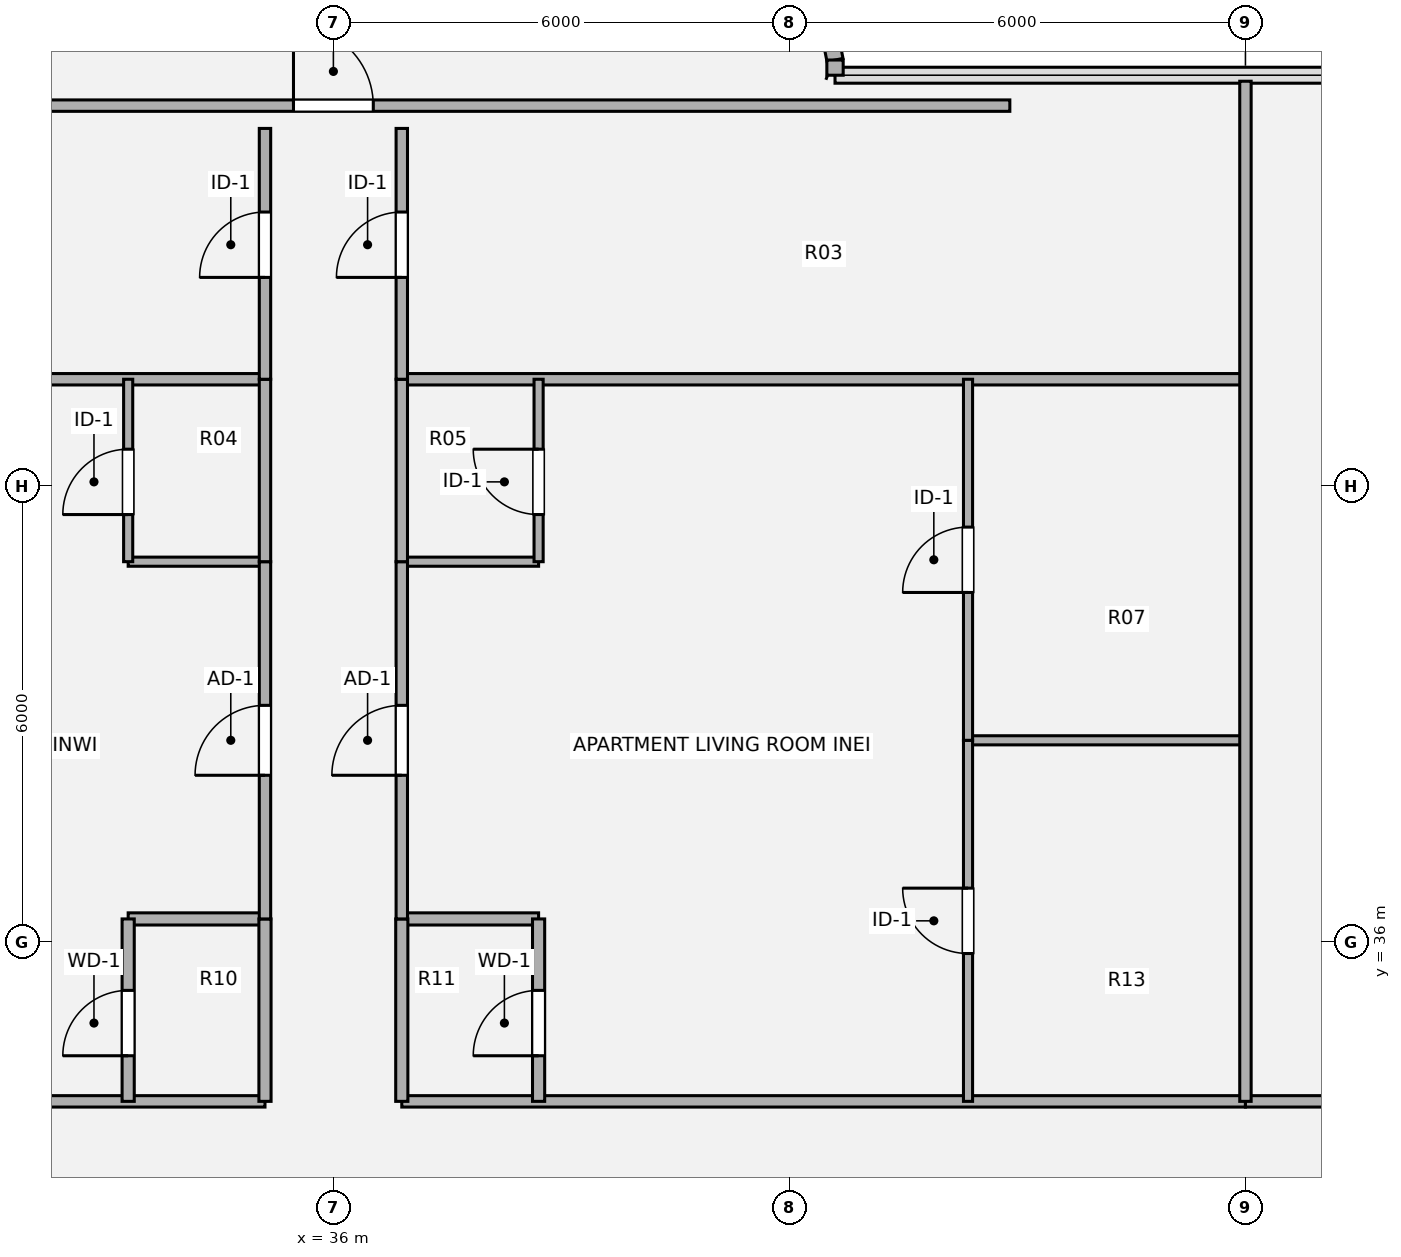
"""IFC4 building model, lengths in metres.
Left out: names, types, materials, properties, quantities, classifications, styles, units other than length and angle.
Written with IfcOpenShell. Run it as: python <this file> out.ifc"""

import sys

from ifc_helpers import new_model, si_unit, direction, frame, frame_2d, origin, origin_2d, place, context, subcontext, project, spatial, rectangle, extrude, source, transform, mapped, element, fill, save


model = new_model("IFC4")
c1 = context("Model", 3, precision=1e-05, world=origin(), true_north=direction((0.0, 1.0)))
c2 = subcontext(c1, "Body", "Model", "MODEL_VIEW")
j1 = project(units=[si_unit("LENGTHUNIT", "METRE"), si_unit("PLANEANGLEUNIT", "RADIAN")], contexts=[c1])
p1 = place(None, origin())
s1 = spatial("IfcSite", under=j1, at=p1, CompositionType="ELEMENT")
p2 = place(p1, origin())
s2 = spatial("IfcBuilding", under=s1, at=p2, CompositionType="ELEMENT")
p3 = place(p2, frame((0.0, 0.0, 93.6)))
s3 = spatial("IfcBuildingStorey", under=s2, at=p3, CompositionType="ELEMENT", Elevation=93.6)
p4 = place(p3, frame((42.387, 48.671, 0.0), z_axis=(0.0, 0.0, 1.0), x_axis=(0.195127417394, -0.980777900945, 0.0)))
e1 = element("IfcWall", 1, at=p4, inside=s3, PredefinedType="SOLIDWALL", context=c2, shape_type="SweptSolid", body=[
    extrude(rectangle(XDim=1.092, YDim=0.215, at=frame_2d((0.546, 0.0))), origin(), (0.0, 0.0, 1.0), 3.53),
])
p5 = place(p3, frame((42.6, 47.6, 0.0), z_axis=(0.0, 0.0, 1.0), x_axis=(0.0, -1.0, 0.0)))
e2 = element("IfcWall", 2, at=p5, inside=s3, PredefinedType="SOLIDWALL", context=c2, shape_type="SweptSolid", body=[
    extrude(rectangle(XDim=0.2, YDim=0.215, at=frame_2d((0.1, 0.0))), origin(), (0.0, 0.0, 1.0), 3.53),
])
for number, where, z_axis, x_axis in (
    (3, (24.0, 33.9, 0.0), (0.0, 0.0, 1.0), (1.0, 0.0, 0.0)),
    (4, (36.9, 33.9, 0.0), (0.0, 0.0, 1.0), (1.0, 0.0, 0.0)),
):
    element("IfcWall", number, at=place(p3, frame(where, z_axis=z_axis, x_axis=x_axis)), inside=s3, PredefinedType="PARTITIONING", context=c2, shape_type="SweptSolid", body=[
        extrude(rectangle(XDim=11.1, YDim=0.15, at=frame_2d((5.55, 0.0))), origin(), (0.0, 0.0, 1.0), 2.982),
    ])
p6 = place(p3, frame((48.0, 33.9, 0.0), z_axis=(0.0, 0.0, 1.0), x_axis=(1.0, 0.0, 0.0)))
e5 = element("IfcWall", 5, at=p6, inside=s3, PredefinedType="PARTITIONING", context=c2, shape_type="SweptSolid", body=[
    extrude(rectangle(XDim=10.02, YDim=0.15, at=frame_2d((5.01, 0.0))), origin(), (0.0, 0.0, 1.0), 2.982),
])
p7 = place(p6, frame((2.275, 0.0, 0.0)))
e6 = element("IfcOpeningElement", 6, at=p7, cuts=e5, PredefinedType="OPENING", context=c2, shape_type="SweptSolid", body=[
    extrude(rectangle(XDim=1.05, YDim=2.1, at=origin_2d()), frame((0.525, 0.085, 1.05), z_axis=(0.0, -1.0, 0.0), x_axis=(1.0, 0.0, 0.0)), (0.0, 0.0, 1.0), 0.17),
])
for number, where, z_axis, x_axis in (
    (7, (33.3, 36.3, 0.0), (0.0, 0.0, 1.0), (1.0, 0.0, 0.0)),
    (8, (36.9, 36.3, 0.0), (0.0, 0.0, 1.0), (1.0, 0.0, 0.0)),
):
    element("IfcWall", number, at=place(p3, frame(where, z_axis=z_axis, x_axis=x_axis)), inside=s3, PredefinedType="PLUMBINGWALL", context=c2, shape_type="SweptSolid", body=[
        extrude(rectangle(XDim=1.8, YDim=0.16, at=frame_2d((0.9, 0.0))), origin(), (0.0, 0.0, 1.0), 3.259),
    ])
p8 = place(p3, frame((44.35, 38.65, 0.0), z_axis=(0.0, 0.0, 1.0), x_axis=(1.0, 0.0, 0.0)))
e9 = element("IfcWall", 9, at=p8, inside=s3, PredefinedType="PARTITIONING", context=c2, shape_type="SweptSolid", body=[
    extrude(rectangle(XDim=3.65, YDim=0.12, at=frame_2d((1.825, 0.0))), origin(), (0.0, 0.0, 1.0), 2.903),
])
for number, where, z_axis, x_axis in (
    (10, (33.3, 41.0, 0.0), (0.0, 0.0, 1.0), (1.0, 0.0, 0.0)),
    (11, (36.9, 41.0, 0.0), (0.0, 0.0, 1.0), (1.0, 0.0, 0.0)),
):
    element("IfcWall", number, at=place(p3, frame(where, z_axis=z_axis, x_axis=x_axis)), inside=s3, PredefinedType="PARTITIONING", context=c2, shape_type="SweptSolid", body=[
        extrude(rectangle(XDim=1.8, YDim=0.12, at=frame_2d((0.9, 0.0))), origin(), (0.0, 0.0, 1.0), 3.259),
    ])
for number, where, z_axis, x_axis in (
    (12, (24.0, 43.4, 0.0), (0.0, 0.0, 1.0), (1.0, 0.0, 0.0)),
    (13, (36.9, 43.4, 0.0), (0.0, 0.0, 1.0), (1.0, 0.0, 0.0)),
):
    element("IfcWall", number, at=place(p3, frame(where, z_axis=z_axis, x_axis=x_axis)), inside=s3, PredefinedType="PARTITIONING", context=c2, shape_type="SweptSolid", body=[
        extrude(rectangle(XDim=11.1, YDim=0.15, at=frame_2d((5.55, 0.0))), origin(), (0.0, 0.0, 1.0), 3.308),
    ])
p9 = place(p3, frame((27.1, 47.0, 0.0), z_axis=(0.0, 0.0, 1.0), x_axis=(1.0, 0.0, 0.0)))
e14 = element("IfcWall", 14, at=p9, inside=s3, PredefinedType="PARTITIONING", context=c2, shape_type="SweptSolid", body=[
    extrude(rectangle(XDim=17.8, YDim=0.15, at=frame_2d((8.9, 0.0))), origin(), (0.0, 0.0, 1.0), 3.308),
])
p10 = place(p9, frame((8.375, 0.0, 0.0)))
e15 = element("IfcOpeningElement", 15, at=p10, cuts=e14, PredefinedType="OPENING", context=c2, shape_type="SweptSolid", body=[
    extrude(rectangle(XDim=1.05, YDim=2.1, at=origin_2d()), frame((0.525, 0.085, 1.05), z_axis=(0.0, -1.0, 0.0), x_axis=(1.0, 0.0, 0.0)), (0.0, 0.0, 1.0), 0.17),
])
p11 = place(p3, frame((33.3, 33.9, 0.0), z_axis=(0.0, 0.0, 1.0), x_axis=(0.0, 1.0, 0.0)))
e16 = element("IfcWall", 16, at=p11, inside=s3, PredefinedType="PLUMBINGWALL", context=c2, shape_type="SweptSolid", body=[
    extrude(rectangle(XDim=2.4, YDim=0.16, at=frame_2d((1.2, 0.0))), origin(), (0.0, 0.0, 1.0), 3.5),
])
p12 = place(p11, frame((0.6, 0.0, 0.0)))
e17 = element("IfcOpeningElement", 17, at=p12, cuts=e16, PredefinedType="OPENING", context=c2, shape_type="SweptSolid", body=[
    extrude(rectangle(XDim=0.86, YDim=2.1, at=origin_2d()), frame((0.43, 0.09, 1.05), z_axis=(0.0, -1.0, 0.0), x_axis=(1.0, 0.0, 0.0)), (0.0, 0.0, 1.0), 0.18),
])
p13 = place(p3, frame((33.3, 41.0, 0.0), z_axis=(0.0, 0.0, 1.0), x_axis=(0.0, 1.0, 0.0)))
e18 = element("IfcWall", 18, at=p13, inside=s3, PredefinedType="PARTITIONING", context=c2, shape_type="SweptSolid", body=[
    extrude(rectangle(XDim=2.4, YDim=0.12, at=frame_2d((1.2, 0.0))), origin(), (0.0, 0.0, 1.0), 3.5),
])
p14 = place(p13, frame((0.62, 0.0, 0.0)))
e19 = element("IfcOpeningElement", 19, at=p14, cuts=e18, PredefinedType="OPENING", context=c2, shape_type="SweptSolid", body=[
    extrude(rectangle(XDim=0.86, YDim=2.1, at=origin_2d()), frame((0.43, 0.07, 1.05), z_axis=(0.0, -1.0, 0.0), x_axis=(1.0, 0.0, 0.0)), (0.0, 0.0, 1.0), 0.14),
])
p15 = place(p3, frame((35.1, 33.9, 0.0), z_axis=(0.0, 0.0, 1.0), x_axis=(0.0, 1.0, 0.0)))
e20 = element("IfcWall", 20, at=p15, inside=s3, PredefinedType="PLUMBINGWALL", context=c2, shape_type="SweptSolid", body=[
    extrude(rectangle(XDim=2.4, YDim=0.16, at=frame_2d((1.2, 0.0))), origin(), (0.0, 0.0, 1.0), 3.5),
])
p16 = place(p3, frame((35.1, 36.3, 0.0), z_axis=(0.0, 0.0, 1.0), x_axis=(0.0, 1.0, 0.0)))
e21 = element("IfcWall", 21, at=p16, inside=s3, PredefinedType="PARTITIONING", context=c2, shape_type="SweptSolid", body=[
    extrude(rectangle(XDim=4.7, YDim=0.15, at=frame_2d((2.35, 0.0))), origin(), (0.0, 0.0, 1.0), 3.5),
])
p17 = place(p16, frame((1.89, 0.0, 0.0)))
e22 = element("IfcOpeningElement", 22, at=p17, cuts=e21, PredefinedType="OPENING", context=c2, shape_type="SweptSolid", body=[
    extrude(rectangle(XDim=0.92, YDim=2.1, at=origin_2d()), frame((0.46, 0.085, 1.05), z_axis=(0.0, -1.0, 0.0), x_axis=(1.0, 0.0, 0.0)), (0.0, 0.0, 1.0), 0.17),
])
p18 = place(p3, frame((35.1, 41.0, 0.0), z_axis=(0.0, 0.0, 1.0), x_axis=(0.0, 1.0, 0.0)))
e23 = element("IfcWall", 23, at=p18, inside=s3, PredefinedType="PARTITIONING", context=c2, shape_type="SweptSolid", body=[
    extrude(rectangle(XDim=2.4, YDim=0.15, at=frame_2d((1.2, 0.0))), origin(), (0.0, 0.0, 1.0), 3.5),
])
p19 = place(p3, frame((35.1, 43.4, 0.0), z_axis=(0.0, 0.0, 1.0), x_axis=(0.0, 1.0, 0.0)))
e24 = element("IfcWall", 24, at=p19, inside=s3, PredefinedType="PARTITIONING", context=c2, shape_type="SweptSolid", body=[
    extrude(rectangle(XDim=3.3, YDim=0.15, at=frame_2d((1.65, 0.0))), origin(), (0.0, 0.0, 1.0), 3.5),
])
p20 = place(p19, frame((1.34, 0.0, 0.0)))
e25 = element("IfcOpeningElement", 25, at=p20, cuts=e24, PredefinedType="OPENING", context=c2, shape_type="SweptSolid", body=[
    extrude(rectangle(XDim=0.86, YDim=2.1, at=origin_2d()), frame((0.43, 0.085, 1.05), z_axis=(0.0, -1.0, 0.0), x_axis=(1.0, 0.0, 0.0)), (0.0, 0.0, 1.0), 0.17),
])
p21 = place(p3, frame((36.9, 33.9, 0.0), z_axis=(0.0, 0.0, 1.0), x_axis=(0.0, 1.0, 0.0)))
e26 = element("IfcWall", 26, at=p21, inside=s3, PredefinedType="PLUMBINGWALL", context=c2, shape_type="SweptSolid", body=[
    extrude(rectangle(XDim=2.4, YDim=0.16, at=frame_2d((1.2, 0.0))), origin(), (0.0, 0.0, 1.0), 3.5),
])
p22 = place(p3, frame((36.9, 36.3, 0.0), z_axis=(0.0, 0.0, 1.0), x_axis=(0.0, 1.0, 0.0)))
e27 = element("IfcWall", 27, at=p22, inside=s3, PredefinedType="PARTITIONING", context=c2, shape_type="SweptSolid", body=[
    extrude(rectangle(XDim=4.7, YDim=0.15, at=frame_2d((2.35, 0.0))), origin(), (0.0, 0.0, 1.0), 3.5),
])
p23 = place(p22, frame((1.89, 0.0, 0.0)))
e28 = element("IfcOpeningElement", 28, at=p23, cuts=e27, PredefinedType="OPENING", context=c2, shape_type="SweptSolid", body=[
    extrude(rectangle(XDim=0.92, YDim=2.1, at=origin_2d()), frame((0.46, 0.085, 1.05), z_axis=(0.0, -1.0, 0.0), x_axis=(1.0, 0.0, 0.0)), (0.0, 0.0, 1.0), 0.17),
])
p24 = place(p3, frame((36.9, 41.0, 0.0), z_axis=(0.0, 0.0, 1.0), x_axis=(0.0, 1.0, 0.0)))
e29 = element("IfcWall", 29, at=p24, inside=s3, PredefinedType="PARTITIONING", context=c2, shape_type="SweptSolid", body=[
    extrude(rectangle(XDim=2.4, YDim=0.15, at=frame_2d((1.2, 0.0))), origin(), (0.0, 0.0, 1.0), 3.5),
])
p25 = place(p3, frame((36.9, 43.4, 0.0), z_axis=(0.0, 0.0, 1.0), x_axis=(0.0, 1.0, 0.0)))
e30 = element("IfcWall", 30, at=p25, inside=s3, PredefinedType="PARTITIONING", context=c2, shape_type="SweptSolid", body=[
    extrude(rectangle(XDim=3.3, YDim=0.15, at=frame_2d((1.65, 0.0))), origin(), (0.0, 0.0, 1.0), 3.5),
])
p26 = place(p25, frame((1.34, 0.0, 0.0)))
e31 = element("IfcOpeningElement", 31, at=p26, cuts=e30, PredefinedType="OPENING", context=c2, shape_type="SweptSolid", body=[
    extrude(rectangle(XDim=0.86, YDim=2.1, at=origin_2d()), frame((0.43, 0.085, 1.05), z_axis=(0.0, -1.0, 0.0), x_axis=(1.0, 0.0, 0.0)), (0.0, 0.0, 1.0), 0.17),
])
p27 = place(p3, frame((38.7, 33.9, 0.0), z_axis=(0.0, 0.0, 1.0), x_axis=(0.0, 1.0, 0.0)))
e32 = element("IfcWall", 32, at=p27, inside=s3, PredefinedType="PLUMBINGWALL", context=c2, shape_type="SweptSolid", body=[
    extrude(rectangle(XDim=2.4, YDim=0.16, at=frame_2d((1.2, 0.0))), origin(), (0.0, 0.0, 1.0), 3.5),
])
p28 = place(p27, frame((0.6, 0.0, 0.0)))
e33 = element("IfcOpeningElement", 33, at=p28, cuts=e32, PredefinedType="OPENING", context=c2, shape_type="SweptSolid", body=[
    extrude(rectangle(XDim=0.86, YDim=2.1, at=origin_2d()), frame((0.43, 0.09, 1.05), z_axis=(0.0, -1.0, 0.0), x_axis=(1.0, 0.0, 0.0)), (0.0, 0.0, 1.0), 0.18),
])
p29 = place(p3, frame((38.7, 41.0, 0.0), z_axis=(0.0, 0.0, 1.0), x_axis=(0.0, 1.0, 0.0)))
e34 = element("IfcWall", 34, at=p29, inside=s3, PredefinedType="PARTITIONING", context=c2, shape_type="SweptSolid", body=[
    extrude(rectangle(XDim=2.4, YDim=0.12, at=frame_2d((1.2, 0.0))), origin(), (0.0, 0.0, 1.0), 3.5),
])
p30 = place(p29, frame((0.62, 0.0, 0.0)))
e35 = element("IfcOpeningElement", 35, at=p30, cuts=e34, PredefinedType="OPENING", context=c2, shape_type="SweptSolid", body=[
    extrude(rectangle(XDim=0.86, YDim=2.1, at=origin_2d()), frame((0.43, 0.07, 1.05), z_axis=(0.0, -1.0, 0.0), x_axis=(1.0, 0.0, 0.0)), (0.0, 0.0, 1.0), 0.14),
])
p31 = place(p3, frame((44.35, 33.9, 0.0), z_axis=(0.0, 0.0, 1.0), x_axis=(0.0, 1.0, 0.0)))
e36 = element("IfcWall", 36, at=p31, inside=s3, PredefinedType="PARTITIONING", context=c2, shape_type="SweptSolid", body=[
    extrude(rectangle(XDim=4.75, YDim=0.12, at=frame_2d((2.375, 0.0))), origin(), (0.0, 0.0, 1.0), 3.5),
])
p32 = place(p31, frame((1.945, 0.0, 0.0)))
e37 = element("IfcOpeningElement", 37, at=p32, cuts=e36, PredefinedType="OPENING", context=c2, shape_type="SweptSolid", body=[
    extrude(rectangle(XDim=0.86, YDim=2.1, at=origin_2d()), frame((0.43, 0.07, 1.05), z_axis=(0.0, -1.0, 0.0), x_axis=(1.0, 0.0, 0.0)), (0.0, 0.0, 1.0), 0.14),
])
p33 = place(p3, frame((44.35, 38.65, 0.0), z_axis=(0.0, 0.0, 1.0), x_axis=(0.0, 1.0, 0.0)))
e38 = element("IfcWall", 38, at=p33, inside=s3, PredefinedType="PARTITIONING", context=c2, shape_type="SweptSolid", body=[
    extrude(rectangle(XDim=4.75, YDim=0.12, at=frame_2d((2.375, 0.0))), origin(), (0.0, 0.0, 1.0), 3.5),
])
p34 = place(p33, frame((1.945, 0.0, 0.0)))
e39 = element("IfcOpeningElement", 39, at=p34, cuts=e38, PredefinedType="OPENING", context=c2, shape_type="SweptSolid", body=[
    extrude(rectangle(XDim=0.86, YDim=2.1, at=origin_2d()), frame((0.43, 0.07, 1.05), z_axis=(0.0, -1.0, 0.0), x_axis=(1.0, 0.0, 0.0)), (0.0, 0.0, 1.0), 0.14),
])
p35 = place(p3, frame((48.0, 33.9, 0.0), z_axis=(0.0, 0.0, 1.0), x_axis=(0.0, 1.0, 0.0)))
e40 = element("IfcWall", 40, at=p35, inside=s3, PredefinedType="PARTITIONING", context=c2, shape_type="SweptSolid", body=[
    extrude(rectangle(XDim=13.421, YDim=0.15, at=frame_2d((6.71, 0.0))), origin(), (0.0, 0.0, 1.0), 3.5),
])
m1 = source(origin(), c2, "Body", "SweptSolid", [
    extrude(rectangle(XDim=1.05, YDim=2.1, at=origin_2d()), frame((0.525, 0.025, 1.05), z_axis=(0.0, -1.0, 0.0), x_axis=(1.0, 0.0, 0.0)), (0.0, 0.0, 1.0), 0.05),
])
p36 = place(p10, origin())
e41 = element("IfcDoor", 41, at=p36, inside=s3, OperationType="SINGLE_SWING_LEFT", PredefinedType="DOOR", context=c2, shape_type="MappedRepresentation", body=[
    mapped(m1, transform((0.0, 0.0, 0.0), x_axis=(1.0, 0.0, 0.0), y_axis=(0.0, 1.0, 0.0), z_axis=(0.0, 0.0, 1.0), scale=1.0)),
])
fill(e15, e41)
m2 = source(origin(), c2, "Body", "SweptSolid", [
    extrude(rectangle(XDim=0.86, YDim=2.1, at=origin_2d()), frame((0.43, 0.025, 1.05), z_axis=(0.0, -1.0, 0.0), x_axis=(1.0, 0.0, 0.0)), (0.0, 0.0, 1.0), 0.05),
])
p37 = place(p12, origin())
e42 = element("IfcDoor", 42, at=p37, inside=s3, OperationType="SINGLE_SWING_LEFT", PredefinedType="DOOR", context=c2, shape_type="MappedRepresentation", body=[
    mapped(m2, transform((0.0, 0.0, 0.0), x_axis=(1.0, 0.0, 0.0), y_axis=(0.0, 1.0, 0.0), z_axis=(0.0, 0.0, 1.0), scale=1.0)),
])
fill(e17, e42)
m3 = source(origin(), c2, "Body", "SweptSolid", [
    extrude(rectangle(XDim=0.86, YDim=2.1, at=origin_2d()), frame((0.43, 0.025, 1.05), z_axis=(0.0, -1.0, 0.0), x_axis=(1.0, 0.0, 0.0)), (0.0, 0.0, 1.0), 0.05),
])
p38 = place(p14, origin())
e43 = element("IfcDoor", 43, at=p38, inside=s3, OperationType="SINGLE_SWING_LEFT", PredefinedType="DOOR", context=c2, shape_type="MappedRepresentation", body=[
    mapped(m3, transform((0.0, 0.0, 0.0), x_axis=(1.0, 0.0, 0.0), y_axis=(0.0, 1.0, 0.0), z_axis=(0.0, 0.0, 1.0), scale=1.0)),
])
fill(e19, e43)
m4 = source(origin(), c2, "Body", "SweptSolid", [
    extrude(rectangle(XDim=0.92, YDim=2.1, at=origin_2d()), frame((0.46, 0.025, 1.05), z_axis=(0.0, -1.0, 0.0), x_axis=(1.0, 0.0, 0.0)), (0.0, 0.0, 1.0), 0.05),
])
p39 = place(p17, origin())
e44 = element("IfcDoor", 44, at=p39, inside=s3, OperationType="SINGLE_SWING_LEFT", PredefinedType="DOOR", context=c2, shape_type="MappedRepresentation", body=[
    mapped(m4, transform((0.0, 0.0, 0.0), x_axis=(1.0, 0.0, 0.0), y_axis=(0.0, 1.0, 0.0), z_axis=(0.0, 0.0, 1.0), scale=1.0)),
])
fill(e22, e44)
p40 = place(p20, origin())
e45 = element("IfcDoor", 45, at=p40, inside=s3, OperationType="SINGLE_SWING_LEFT", PredefinedType="DOOR", context=c2, shape_type="MappedRepresentation", body=[
    mapped(m3, transform((0.0, 0.0, 0.0), x_axis=(1.0, 0.0, 0.0), y_axis=(0.0, 1.0, 0.0), z_axis=(0.0, 0.0, 1.0), scale=1.0)),
])
fill(e25, e45)
p41 = place(p23, origin())
e46 = element("IfcDoor", 46, at=p41, inside=s3, OperationType="SINGLE_SWING_LEFT", PredefinedType="DOOR", context=c2, shape_type="MappedRepresentation", body=[
    mapped(m4, transform((0.0, 0.0, 0.0), x_axis=(1.0, 0.0, 0.0), y_axis=(0.0, 1.0, 0.0), z_axis=(0.0, 0.0, 1.0), scale=1.0)),
])
fill(e28, e46)
p42 = place(p26, origin())
e47 = element("IfcDoor", 47, at=p42, inside=s3, OperationType="SINGLE_SWING_LEFT", PredefinedType="DOOR", context=c2, shape_type="MappedRepresentation", body=[
    mapped(m3, transform((0.0, 0.0, 0.0), x_axis=(1.0, 0.0, 0.0), y_axis=(0.0, 1.0, 0.0), z_axis=(0.0, 0.0, 1.0), scale=1.0)),
])
fill(e31, e47)
p43 = place(p28, origin())
e48 = element("IfcDoor", 48, at=p43, inside=s3, OperationType="SINGLE_SWING_LEFT", PredefinedType="DOOR", context=c2, shape_type="MappedRepresentation", body=[
    mapped(m2, transform((0.0, 0.0, 0.0), x_axis=(1.0, 0.0, 0.0), y_axis=(0.0, 1.0, 0.0), z_axis=(0.0, 0.0, 1.0), scale=1.0)),
])
fill(e33, e48)
p44 = place(p30, origin())
e49 = element("IfcDoor", 49, at=p44, inside=s3, OperationType="SINGLE_SWING_RIGHT", PredefinedType="DOOR", context=c2, shape_type="MappedRepresentation", body=[
    mapped(m3, transform((0.0, 0.0, 0.0), x_axis=(1.0, 0.0, 0.0), y_axis=(0.0, 1.0, 0.0), z_axis=(0.0, 0.0, 1.0), scale=1.0)),
])
fill(e35, e49)
p45 = place(p32, origin())
e50 = element("IfcDoor", 50, at=p45, inside=s3, OperationType="SINGLE_SWING_RIGHT", PredefinedType="DOOR", context=c2, shape_type="MappedRepresentation", body=[
    mapped(m3, transform((0.0, 0.0, 0.0), x_axis=(1.0, 0.0, 0.0), y_axis=(0.0, 1.0, 0.0), z_axis=(0.0, 0.0, 1.0), scale=1.0)),
])
fill(e37, e50)
p46 = place(p34, origin())
e51 = element("IfcDoor", 51, at=p46, inside=s3, OperationType="SINGLE_SWING_LEFT", PredefinedType="DOOR", context=c2, shape_type="MappedRepresentation", body=[
    mapped(m3, transform((0.0, 0.0, 0.0), x_axis=(1.0, 0.0, 0.0), y_axis=(0.0, 1.0, 0.0), z_axis=(0.0, 0.0, 1.0), scale=1.0)),
])
fill(e39, e51)
save(model, sys.argv[1])
